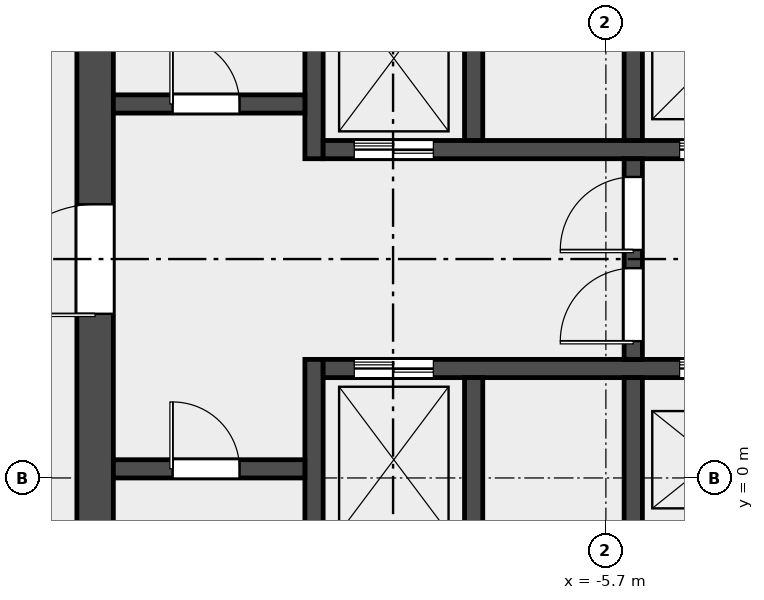
"""IFC4 building model, lengths in metres.
Left out: names, types, materials, properties, quantities, classifications, styles, units other than length and angle.
Written with IfcOpenShell. Run it as: python <this file> out.ifc"""

import sys

from ifc_helpers import new_model, si_unit, direction, frame, frame_2d, origin, place, context, subcontext, project, spatial, rectangle, extrude, element, fill, save


model = new_model("IFC4")
c1 = context("Model", 3, precision=1e-05, world=origin(), true_north=direction((0.0, 1.0)))
c2 = subcontext(c1, "Body", "Model", "MODEL_VIEW")
j1 = project(units=[si_unit("LENGTHUNIT", "METRE"), si_unit("PLANEANGLEUNIT", "RADIAN")], contexts=[c1])
p1 = place(None, origin())
s1 = spatial("IfcSite", under=j1, at=p1, CompositionType="ELEMENT")
p2 = place(p1, origin())
s2 = spatial("IfcBuilding", under=s1, at=p2, CompositionType="ELEMENT")
p3 = place(p2, origin())
s3 = spatial("IfcBuildingStorey", under=s2, at=p3, CompositionType="ELEMENT", Elevation=0.0)
p4 = place(p3, frame((-14.1, -6.6, 0.0), z_axis=(0.0, 0.0, 1.0), x_axis=(0.0, 1.0, 0.0)))
e1 = element("IfcWall", 1, at=p4, inside=s3, PredefinedType="SHEAR", context=c2, shape_type="SweptSolid", body=[
    extrude(rectangle(XDim=19.5, YDim=0.6, at=frame_2d((9.75, 0.0))), origin(), (0.0, 0.0, 1.0), 8.7),
])
p5 = place(p4, frame((9.3, 0.0, 0.0)))
e2 = element("IfcOpeningElement", 2, at=p5, cuts=e1, PredefinedType="OPENING", context=c2, shape_type="SweptSolid", body=[
    extrude(rectangle(XDim=1.8, YDim=2.1, at=frame_2d((0.9, 1.05))), frame((0.0, 0.312, 0.0), z_axis=(0.0, -1.0, 0.0), x_axis=(1.0, 0.0, 0.0)), (0.0, 0.0, 1.0), 0.624),
])
p6 = place(p3, frame((-10.5, -6.6, 0.0), z_axis=(0.0, 0.0, 1.0), x_axis=(0.0, 1.0, 0.0)))
e3 = element("IfcWall", 3, at=p6, inside=s3, PredefinedType="SHEAR", context=c2, shape_type="SweptSolid", body=[
    extrude(rectangle(XDim=8.55, YDim=0.3, at=frame_2d((4.275, 0.0))), origin(), (0.0, 0.0, 1.0), 8.7),
])
p7 = place(p3, frame((-10.5, 5.25, 0.0), z_axis=(0.0, 0.0, 1.0), x_axis=(0.0, 1.0, 0.0)))
e4 = element("IfcWall", 4, at=p7, inside=s3, PredefinedType="SHEAR", context=c2, shape_type="SweptSolid", body=[
    extrude(rectangle(XDim=7.65, YDim=0.3, at=frame_2d((3.825, 0.0))), origin(), (0.0, 0.0, 1.0), 8.7),
])
p8 = place(p3, frame((-13.8, 0.15, 0.0), z_axis=(0.0, 0.0, 1.0), x_axis=(1.0, 0.0, 0.0)))
e5 = element("IfcWall", 5, at=p8, inside=s3, PredefinedType="SOLIDWALL", context=c2, shape_type="SweptSolid", body=[
    extrude(rectangle(XDim=3.15, YDim=0.3, at=frame_2d((1.575, 0.0))), origin(), (0.0, 0.0, 1.0), 8.7),
])
p9 = place(p8, frame((0.975, 0.0, 0.0)))
e6 = element("IfcOpeningElement", 6, at=p9, cuts=e5, PredefinedType="OPENING", context=c2, shape_type="SweptSolid", body=[
    extrude(rectangle(XDim=1.1, YDim=2.1, at=frame_2d((0.55, 1.05))), frame((0.0, 0.162, 0.0), z_axis=(0.0, -1.0, 0.0), x_axis=(1.0, 0.0, 0.0)), (0.0, 0.0, 1.0), 0.324),
])
p10 = place(p3, frame((-13.8, 6.15, 0.0), z_axis=(0.0, 0.0, 1.0), x_axis=(1.0, 0.0, 0.0)))
e7 = element("IfcWall", 7, at=p10, inside=s3, PredefinedType="SOLIDWALL", context=c2, shape_type="SweptSolid", body=[
    extrude(rectangle(XDim=3.15, YDim=0.3, at=frame_2d((1.575, 0.0))), origin(), (0.0, 0.0, 1.0), 8.7),
])
p11 = place(p10, frame((0.975, 0.0, 0.0)))
e8 = element("IfcOpeningElement", 8, at=p11, cuts=e7, PredefinedType="OPENING", context=c2, shape_type="SweptSolid", body=[
    extrude(rectangle(XDim=1.1, YDim=2.1, at=frame_2d((0.55, 1.05))), frame((0.0, 0.162, 0.0), z_axis=(0.0, -1.0, 0.0), x_axis=(1.0, 0.0, 0.0)), (0.0, 0.0, 1.0), 0.324),
])
p12 = place(p3, frame((-10.35, 1.8, -1.8), z_axis=(0.0, 0.0, 1.0), x_axis=(1.0, 0.0, 0.0)))
e9 = element("IfcWall", 9, at=p12, inside=s3, PredefinedType="SOLIDWALL", context=c2, shape_type="SweptSolid", body=[
    extrude(rectangle(XDim=20.7, YDim=0.3, at=frame_2d((10.35, 0.0))), origin(), (0.0, 0.0, 1.0), 10.5),
])
p13 = place(p12, frame((0.512, 0.0, 1.8)))
e10 = element("IfcOpeningElement", 10, at=p13, cuts=e9, PredefinedType="OPENING", context=c2, shape_type="SweptSolid", body=[
    extrude(rectangle(XDim=1.3, YDim=2.1, at=frame_2d((0.65, 1.05))), frame((0.0, 0.162, 0.0), z_axis=(0.0, -1.0, 0.0), x_axis=(1.0, 0.0, 0.0)), (0.0, 0.0, 1.0), 0.324),
])
p14 = place(p12, frame((5.863, 0.0, 1.8)))
e11 = element("IfcOpeningElement", 11, at=p14, cuts=e9, PredefinedType="OPENING", context=c2, shape_type="SweptSolid", body=[
    extrude(rectangle(XDim=1.1, YDim=2.1, at=frame_2d((0.55, 1.05))), frame((0.0, 0.162, 0.0), z_axis=(0.0, -1.0, 0.0), x_axis=(1.0, 0.0, 0.0)), (0.0, 0.0, 1.0), 0.324),
])
p15 = place(p12, frame((8.488, 0.0, 1.8)))
e12 = element("IfcOpeningElement", 12, at=p15, cuts=e9, PredefinedType="OPENING", context=c2, shape_type="SweptSolid", body=[
    extrude(rectangle(XDim=1.1, YDim=2.1, at=frame_2d((0.55, 1.05))), frame((0.0, 0.162, 0.0), z_axis=(0.0, -1.0, 0.0), x_axis=(1.0, 0.0, 0.0)), (0.0, 0.0, 1.0), 0.324),
])
p16 = place(p12, frame((11.113, 0.0, 1.8)))
e13 = element("IfcOpeningElement", 13, at=p16, cuts=e9, PredefinedType="OPENING", context=c2, shape_type="SweptSolid", body=[
    extrude(rectangle(XDim=1.1, YDim=2.1, at=frame_2d((0.55, 1.05))), frame((0.0, 0.162, 0.0), z_axis=(0.0, -1.0, 0.0), x_axis=(1.0, 0.0, 0.0)), (0.0, 0.0, 1.0), 0.324),
])
p17 = place(p12, frame((13.738, 0.0, 1.8)))
e14 = element("IfcOpeningElement", 14, at=p17, cuts=e9, PredefinedType="OPENING", context=c2, shape_type="SweptSolid", body=[
    extrude(rectangle(XDim=1.1, YDim=2.1, at=frame_2d((0.55, 1.05))), frame((0.0, 0.162, 0.0), z_axis=(0.0, -1.0, 0.0), x_axis=(1.0, 0.0, 0.0)), (0.0, 0.0, 1.0), 0.324),
])
p18 = place(p12, frame((16.363, 0.0, 1.8)))
e15 = element("IfcOpeningElement", 15, at=p18, cuts=e9, PredefinedType="OPENING", context=c2, shape_type="SweptSolid", body=[
    extrude(rectangle(XDim=1.1, YDim=2.1, at=frame_2d((0.55, 1.05))), frame((0.0, 0.162, 0.0), z_axis=(0.0, -1.0, 0.0), x_axis=(1.0, 0.0, 0.0)), (0.0, 0.0, 1.0), 0.324),
])
p19 = place(p12, frame((18.988, 0.0, 1.8)))
e16 = element("IfcOpeningElement", 16, at=p19, cuts=e9, PredefinedType="OPENING", context=c2, shape_type="SweptSolid", body=[
    extrude(rectangle(XDim=1.1, YDim=2.1, at=frame_2d((0.55, 1.05))), frame((0.0, 0.162, 0.0), z_axis=(0.0, -1.0, 0.0), x_axis=(1.0, 0.0, 0.0)), (0.0, 0.0, 1.0), 0.324),
])
p20 = place(p3, frame((-10.35, 5.4, -1.8), z_axis=(0.0, 0.0, 1.0), x_axis=(1.0, 0.0, 0.0)))
e17 = element("IfcWall", 17, at=p20, inside=s3, PredefinedType="SOLIDWALL", context=c2, shape_type="SweptSolid", body=[
    extrude(rectangle(XDim=20.7, YDim=0.3, at=frame_2d((10.35, 0.0))), origin(), (0.0, 0.0, 1.0), 10.5),
])
p21 = place(p20, frame((0.512, 0.0, 1.8)))
e18 = element("IfcOpeningElement", 18, at=p21, cuts=e17, PredefinedType="OPENING", context=c2, shape_type="SweptSolid", body=[
    extrude(rectangle(XDim=1.3, YDim=2.1, at=frame_2d((0.65, 1.05))), frame((0.0, 0.162, 0.0), z_axis=(0.0, -1.0, 0.0), x_axis=(1.0, 0.0, 0.0)), (0.0, 0.0, 1.0), 0.324),
])
p22 = place(p20, frame((5.863, 0.0, 1.8)))
e19 = element("IfcOpeningElement", 19, at=p22, cuts=e17, PredefinedType="OPENING", context=c2, shape_type="SweptSolid", body=[
    extrude(rectangle(XDim=1.1, YDim=2.1, at=frame_2d((0.55, 1.05))), frame((0.0, 0.162, 0.0), z_axis=(0.0, -1.0, 0.0), x_axis=(1.0, 0.0, 0.0)), (0.0, 0.0, 1.0), 0.324),
])
p23 = place(p20, frame((8.488, 0.0, 1.8)))
e20 = element("IfcOpeningElement", 20, at=p23, cuts=e17, PredefinedType="OPENING", context=c2, shape_type="SweptSolid", body=[
    extrude(rectangle(XDim=1.1, YDim=2.1, at=frame_2d((0.55, 1.05))), frame((0.0, 0.162, 0.0), z_axis=(0.0, -1.0, 0.0), x_axis=(1.0, 0.0, 0.0)), (0.0, 0.0, 1.0), 0.324),
])
p24 = place(p20, frame((11.113, 0.0, 1.8)))
e21 = element("IfcOpeningElement", 21, at=p24, cuts=e17, PredefinedType="OPENING", context=c2, shape_type="SweptSolid", body=[
    extrude(rectangle(XDim=1.1, YDim=2.1, at=frame_2d((0.55, 1.05))), frame((0.0, 0.162, 0.0), z_axis=(0.0, -1.0, 0.0), x_axis=(1.0, 0.0, 0.0)), (0.0, 0.0, 1.0), 0.324),
])
p25 = place(p20, frame((13.738, 0.0, 1.8)))
e22 = element("IfcOpeningElement", 22, at=p25, cuts=e17, PredefinedType="OPENING", context=c2, shape_type="SweptSolid", body=[
    extrude(rectangle(XDim=1.1, YDim=2.1, at=frame_2d((0.55, 1.05))), frame((0.0, 0.162, 0.0), z_axis=(0.0, -1.0, 0.0), x_axis=(1.0, 0.0, 0.0)), (0.0, 0.0, 1.0), 0.324),
])
p26 = place(p20, frame((16.363, 0.0, 1.8)))
e23 = element("IfcOpeningElement", 23, at=p26, cuts=e17, PredefinedType="OPENING", context=c2, shape_type="SweptSolid", body=[
    extrude(rectangle(XDim=1.1, YDim=2.1, at=frame_2d((0.55, 1.05))), frame((0.0, 0.162, 0.0), z_axis=(0.0, -1.0, 0.0), x_axis=(1.0, 0.0, 0.0)), (0.0, 0.0, 1.0), 0.324),
])
p27 = place(p20, frame((18.988, 0.0, 1.8)))
e24 = element("IfcOpeningElement", 24, at=p27, cuts=e17, PredefinedType="OPENING", context=c2, shape_type="SweptSolid", body=[
    extrude(rectangle(XDim=1.1, YDim=2.1, at=frame_2d((0.55, 1.05))), frame((0.0, 0.162, 0.0), z_axis=(0.0, -1.0, 0.0), x_axis=(1.0, 0.0, 0.0)), (0.0, 0.0, 1.0), 0.324),
])
for number, where, z_axis, x_axis in (
    (25, (-7.875, -1.05, -1.8), (0.0, 0.0, 1.0), (0.0, 1.0, 0.0)),
    (26, (-5.25, -1.05, -1.8), (0.0, 0.0, 1.0), (0.0, 1.0, 0.0)),
    (27, (-7.875, 5.55, -1.8), (0.0, 0.0, 1.0), (0.0, 1.0, 0.0)),
    (28, (-5.25, 5.55, -1.8), (0.0, 0.0, 1.0), (0.0, 1.0, 0.0)),
):
    element("IfcWall", number, at=place(p3, frame(where, z_axis=z_axis, x_axis=x_axis)), inside=s3, PredefinedType="SOLIDWALL", context=c2, shape_type="SweptSolid", body=[
        extrude(rectangle(XDim=2.7, YDim=0.3, at=frame_2d((1.35, 0.0))), origin(), (0.0, 0.0, 1.0), 10.5),
    ])
p28 = place(p3, frame((-5.25, 1.95, 0.0), z_axis=(0.0, 0.0, 1.0), x_axis=(0.0, 1.0, 0.0)))
e29 = element("IfcWall", 29, at=p28, inside=s3, PredefinedType="SOLIDWALL", context=c2, shape_type="SweptSolid", body=[
    extrude(rectangle(XDim=3.3, YDim=0.3, at=frame_2d((1.65, 0.0))), origin(), (0.0, 0.0, 1.0), 8.7),
])
p29 = place(p28, frame((0.3, 0.0, 0.0)))
e30 = element("IfcOpeningElement", 30, at=p29, cuts=e29, PredefinedType="OPENING", context=c2, shape_type="SweptSolid", body=[
    extrude(rectangle(XDim=1.2, YDim=2.1, at=frame_2d((0.6, 1.05))), frame((0.0, 0.162, 0.0), z_axis=(0.0, -1.0, 0.0), x_axis=(1.0, 0.0, 0.0)), (0.0, 0.0, 1.0), 0.324),
])
p30 = place(p28, frame((1.8, 0.0, 0.0)))
e31 = element("IfcOpeningElement", 31, at=p30, cuts=e29, PredefinedType="OPENING", context=c2, shape_type="SweptSolid", body=[
    extrude(rectangle(XDim=1.2, YDim=2.1, at=frame_2d((0.6, 1.05))), frame((0.0, 0.162, 0.0), z_axis=(0.0, -1.0, 0.0), x_axis=(1.0, 0.0, 0.0)), (0.0, 0.0, 1.0), 0.324),
])
p31 = place(p9, origin())
e32 = element("IfcDoor", 32, at=p31, inside=s3, OperationType="SINGLE_SWING_LEFT", PredefinedType="DOOR", context=c2, shape_type="SweptSolid", body=[
    extrude(rectangle(XDim=1.1, YDim=2.1, at=frame_2d((0.55, 1.05))), frame((0.0, 0.025, 0.0), z_axis=(0.0, -1.0, 0.0), x_axis=(1.0, 0.0, 0.0)), (0.0, 0.0, 1.0), 0.05),
])
fill(e6, e32)
p32 = place(p11, origin())
e33 = element("IfcDoor", 33, at=p32, inside=s3, OperationType="SINGLE_SWING_LEFT", PredefinedType="DOOR", context=c2, shape_type="SweptSolid", body=[
    extrude(rectangle(XDim=1.1, YDim=2.1, at=frame_2d((0.55, 1.05))), frame((0.0, 0.025, 0.0), z_axis=(0.0, -1.0, 0.0), x_axis=(1.0, 0.0, 0.0)), (0.0, 0.0, 1.0), 0.05),
])
fill(e8, e33)
p33 = place(p5, origin())
e34 = element("IfcDoor", 34, at=p33, inside=s3, OperationType="DOUBLE_DOOR_SINGLE_SWING", PredefinedType="DOOR", context=c2, shape_type="SweptSolid", body=[
    extrude(rectangle(XDim=1.8, YDim=2.1, at=frame_2d((0.9, 1.05))), frame((0.0, 0.025, 0.0), z_axis=(0.0, -1.0, 0.0), x_axis=(1.0, 0.0, 0.0)), (0.0, 0.0, 1.0), 0.05),
])
fill(e2, e34)
p34 = place(p29, origin())
e35 = element("IfcDoor", 35, at=p34, inside=s3, OperationType="SINGLE_SWING_LEFT", PredefinedType="DOOR", context=c2, shape_type="SweptSolid", body=[
    extrude(rectangle(XDim=1.2, YDim=2.1, at=frame_2d((0.6, 1.05))), frame((0.0, 0.025, 0.0), z_axis=(0.0, -1.0, 0.0), x_axis=(1.0, 0.0, 0.0)), (0.0, 0.0, 1.0), 0.05),
])
fill(e30, e35)
p35 = place(p30, origin())
e36 = element("IfcDoor", 36, at=p35, inside=s3, OperationType="SINGLE_SWING_RIGHT", PredefinedType="DOOR", context=c2, shape_type="SweptSolid", body=[
    extrude(rectangle(XDim=1.2, YDim=2.1, at=frame_2d((0.6, 1.05))), frame((0.0, 0.025, 0.0), z_axis=(0.0, -1.0, 0.0), x_axis=(1.0, 0.0, 0.0)), (0.0, 0.0, 1.0), 0.05),
])
fill(e31, e36)
p36 = place(p13, origin())
e37 = element("IfcDoor", 37, at=p36, inside=s3, OperationType="DOUBLE_DOOR_SLIDING", PredefinedType="DOOR", context=c2, shape_type="SweptSolid", body=[
    extrude(rectangle(XDim=1.3, YDim=2.1, at=frame_2d((0.65, 1.05))), frame((0.0, 0.025, 0.0), z_axis=(0.0, -1.0, 0.0), x_axis=(1.0, 0.0, 0.0)), (0.0, 0.0, 1.0), 0.05),
])
fill(e10, e37)
p37 = place(p14, origin())
e38 = element("IfcDoor", 38, at=p37, inside=s3, OperationType="DOUBLE_DOOR_SLIDING", PredefinedType="DOOR", context=c2, shape_type="SweptSolid", body=[
    extrude(rectangle(XDim=1.1, YDim=2.1, at=frame_2d((0.55, 1.05))), frame((0.0, 0.025, 0.0), z_axis=(0.0, -1.0, 0.0), x_axis=(1.0, 0.0, 0.0)), (0.0, 0.0, 1.0), 0.05),
])
fill(e11, e38)
p38 = place(p21, origin())
e39 = element("IfcDoor", 39, at=p38, inside=s3, OperationType="DOUBLE_DOOR_SLIDING", PredefinedType="DOOR", context=c2, shape_type="SweptSolid", body=[
    extrude(rectangle(XDim=1.3, YDim=2.1, at=frame_2d((0.65, 1.05))), frame((0.0, 0.025, 0.0), z_axis=(0.0, -1.0, 0.0), x_axis=(1.0, 0.0, 0.0)), (0.0, 0.0, 1.0), 0.05),
])
fill(e18, e39)
p39 = place(p22, origin())
e40 = element("IfcDoor", 40, at=p39, inside=s3, OperationType="DOUBLE_DOOR_SLIDING", PredefinedType="DOOR", context=c2, shape_type="SweptSolid", body=[
    extrude(rectangle(XDim=1.1, YDim=2.1, at=frame_2d((0.55, 1.05))), frame((0.0, 0.025, 0.0), z_axis=(0.0, -1.0, 0.0), x_axis=(1.0, 0.0, 0.0)), (0.0, 0.0, 1.0), 0.05),
])
fill(e19, e40)
save(model, sys.argv[1])
